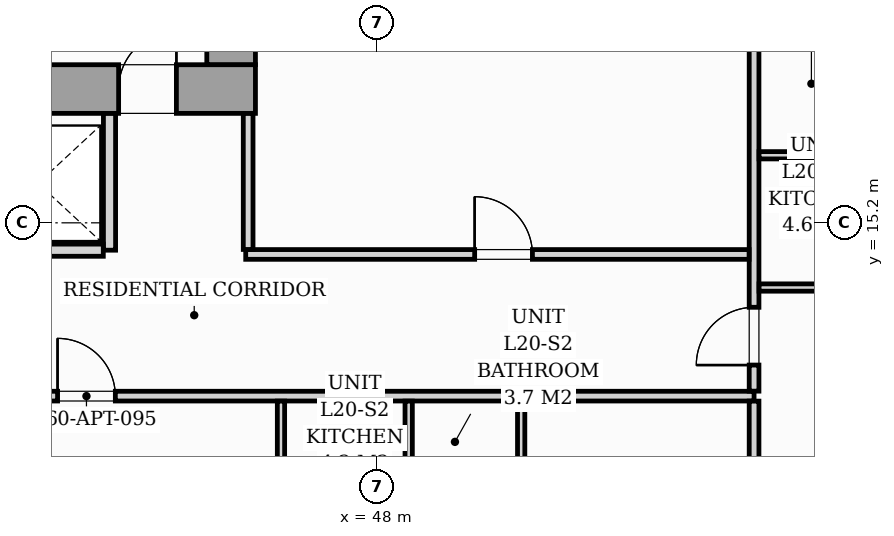
"""IFC4 building model, lengths in metres.
Left out: names, types, materials, properties, quantities, classifications, styles, units other than length and angle.
Written with IfcOpenShell. Run it as: python <this file> out.ifc"""

import sys

from ifc_helpers import new_model, si_unit, direction, frame, frame_2d, origin, origin_2d, place, context, subcontext, project, spatial, rectangle, i_section, extrude, source, transform, mapped, element, fill, save


model = new_model("IFC4")
c1 = context("Model", 3, precision=1e-05, world=origin(), true_north=direction((0.0, 1.0)))
c2 = subcontext(c1, "Body", "Model", "MODEL_VIEW")
j1 = project(units=[si_unit("LENGTHUNIT", "METRE"), si_unit("PLANEANGLEUNIT", "RADIAN")], contexts=[c1])
p1 = place(None, origin())
s1 = spatial("IfcSite", under=j1, at=p1, CompositionType="ELEMENT")
p2 = place(p1, origin())
s2 = spatial("IfcBuilding", under=s1, at=p2, CompositionType="ELEMENT")
p3 = place(p2, frame((0.0, 0.0, 72.6)))
s3 = spatial("IfcBuildingStorey", under=s2, at=p3, CompositionType="ELEMENT", Elevation=72.6)
m1 = source(origin(), c2, "Body", "SweptSolid", [
    extrude(i_section(OverallWidth=0.427, OverallDepth=0.483, WebThickness=0.051, FlangeThickness=0.082, FilletRadius=0.018, at=origin_2d()), origin(), (0.0, 0.0, 1.0), 5.196),
])
p4 = place(p3, frame((45.6, 17.4, 0.002), z_axis=(0.0, 0.0, 1.0), x_axis=(1.0, 0.0, 0.0)))
e1 = element("IfcColumn", 1, at=p4, inside=s3, PredefinedType="PILASTER", context=c2, shape_type="MappedRepresentation", body=[
    mapped(m1, transform((0.0, 0.0, 0.0), scale=1.0)),
])
p5 = place(p3, frame((26.0, 17.4, 0.0), z_axis=(0.0, 0.0, 1.0), x_axis=(1.0, 0.0, 0.0)))
e2 = element("IfcWall", 2, at=p5, inside=s3, PredefinedType="SHEAR", context=c2, shape_type="SweptSolid", body=[
    extrude(rectangle(XDim=20.0, YDim=0.8, at=frame_2d((10.0, 0.0))), origin(), (0.0, 0.0, 1.0), 5.2),
])
p6 = place(p5, frame((1.15, 0.0, 0.0)))
e3 = element("IfcOpeningElement", 3, at=p6, cuts=e2, PredefinedType="OPENING", context=c2, shape_type="SweptSolid", body=[
    extrude(rectangle(XDim=0.95, YDim=2.06, at=frame_2d((0.475, 1.03))), frame((0.0, 0.41, 0.0), z_axis=(0.0, -1.0, 0.0), x_axis=(1.0, 0.0, 0.0)), (0.0, 0.0, 1.0), 0.82),
])
p7 = place(p5, frame((9.58, 0.0, 0.0)))
e4 = element("IfcOpeningElement", 4, at=p7, cuts=e2, PredefinedType="OPENING", context=c2, shape_type="SweptSolid", body=[
    extrude(rectangle(XDim=0.9, YDim=2.06, at=frame_2d((0.45, 1.03))), frame((0.0, 0.41, 0.0), z_axis=(0.0, -1.0, 0.0), x_axis=(1.0, 0.0, 0.0)), (0.0, 0.0, 1.0), 0.82),
])
p8 = place(p5, frame((17.75, 0.0, 0.0)))
e5 = element("IfcOpeningElement", 5, at=p8, cuts=e2, PredefinedType="OPENING", context=c2, shape_type="SweptSolid", body=[
    extrude(rectangle(XDim=0.95, YDim=2.06, at=frame_2d((0.475, 1.03))), frame((0.0, 0.41, 0.0), z_axis=(0.0, -1.0, 0.0), x_axis=(1.0, 0.0, 0.0)), (0.0, 0.0, 1.0), 0.82),
])
p9 = place(p3, frame((45.6, 17.802, 0.0), z_axis=(0.0, 0.0, 1.0), x_axis=(0.0, 1.0, 0.0)))
e6 = element("IfcWall", 6, at=p9, inside=s3, PredefinedType="SHEAR", context=c2, shape_type="SweptSolid", body=[
    extrude(rectangle(XDim=5.796, YDim=0.8, at=frame_2d((2.898, 0.0))), origin(), (0.0, 0.0, 1.0), 5.2),
])
p10 = place(p3, frame((43.6, 14.75, 0.0), z_axis=(0.0, 0.0, 1.0), x_axis=(0.0, 1.0, 0.0)))
e7 = element("IfcWall", 7, at=p10, inside=s3, PredefinedType="PARTITIONING", context=c2, shape_type="SweptSolid", body=[
    extrude(rectangle(XDim=2.248, YDim=0.2, at=frame_2d((1.124, 0.0))), origin(), (0.0, 0.0, 1.0), 4.78),
])
p11 = place(p3, frame((41.352, 14.75, 0.0), z_axis=(0.0, 0.0, 1.0), x_axis=(1.0, 0.0, 0.0)))
e8 = element("IfcWall", 8, at=p11, inside=s3, PredefinedType="PARTITIONING", context=c2, shape_type="SweptSolid", body=[
    extrude(rectangle(XDim=2.146, YDim=0.2, at=frame_2d((1.073, 0.0))), origin(), (0.0, 0.0, 1.0), 4.78),
])
p12 = place(p3, frame((16.6, 12.35, 0.0), z_axis=(0.0, 0.0, 1.0), x_axis=(1.0, 0.0, 0.0)))
e9 = element("IfcWall", 9, at=p12, inside=s3, PredefinedType="PARTITIONING", context=c2, shape_type="SweptSolid", body=[
    extrude(rectangle(XDim=37.6, YDim=0.16, at=frame_2d((18.8, 0.0))), origin(), (0.0, 0.0, 1.0), 4.78),
])
p13 = place(p12, frame((2.665, 0.0, 0.0)))
e10 = element("IfcOpeningElement", 10, at=p13, cuts=e9, PredefinedType="OPENING", context=c2, shape_type="SweptSolid", body=[
    extrude(rectangle(XDim=0.95, YDim=2.06, at=frame_2d((0.475, 1.03))), frame((0.0, 0.09, 0.0), z_axis=(0.0, -1.0, 0.0), x_axis=(1.0, 0.0, 0.0)), (0.0, 0.0, 1.0), 0.18),
])
p14 = place(p12, frame((26.146, 0.0, 0.0)))
e11 = element("IfcOpeningElement", 11, at=p14, cuts=e9, PredefinedType="OPENING", context=c2, shape_type="SweptSolid", body=[
    extrude(rectangle(XDim=0.95, YDim=2.06, at=frame_2d((0.475, 1.03))), frame((0.0, 0.09, 0.0), z_axis=(0.0, -1.0, 0.0), x_axis=(1.0, 0.0, 0.0)), (0.0, 0.0, 1.0), 0.18),
])
p15 = place(p3, frame((54.2, 7.778, 0.0), z_axis=(0.0, 0.0, 1.0), x_axis=(0.0, 1.0, 0.0)))
e12 = element("IfcWall", 12, at=p15, inside=s3, PredefinedType="PARTITIONING", context=c2, shape_type="SweptSolid", body=[
    extrude(rectangle(XDim=4.49, YDim=0.16, at=frame_2d((2.245, 0.0))), origin(), (0.0, 0.0, 1.0), 4.78),
])
p16 = place(p3, frame((54.2, 12.432, 0.0), z_axis=(0.0, 0.0, 1.0), x_axis=(0.0, 1.0, 0.0)))
e13 = element("IfcWall", 13, at=p16, inside=s3, PredefinedType="PARTITIONING", context=c2, shape_type="SweptSolid", body=[
    extrude(rectangle(XDim=15.278, YDim=0.16, at=frame_2d((7.639, 0.0))), origin(), (0.0, 0.0, 1.0), 4.78),
])
p17 = place(p16, frame((0.429, 0.0, 0.0)))
e14 = element("IfcOpeningElement", 14, at=p17, cuts=e13, PredefinedType="OPENING", context=c2, shape_type="SweptSolid", body=[
    extrude(rectangle(XDim=0.95, YDim=2.06, at=frame_2d((0.475, 1.03))), frame((0.0, 0.09, 0.0), z_axis=(0.0, -1.0, 0.0), x_axis=(1.0, 0.0, 0.0)), (0.0, 0.0, 1.0), 0.18),
])
p18 = place(p3, frame((50.37, 7.593, 0.0), z_axis=(0.0, 0.0, 1.0), x_axis=(0.0, 1.0, 0.0)))
e15 = element("IfcWall", 15, at=p18, inside=s3, PredefinedType="PARTITIONING", context=c2, shape_type="SweptSolid", body=[
    extrude(rectangle(XDim=4.676, YDim=0.12, at=frame_2d((2.338, 0.0))), origin(), (0.0, 0.0, 1.0), 4.78),
])
p19 = place(p18, frame((2.633, 0.0, 0.0)))
e16 = element("IfcOpeningElement", 16, at=p19, cuts=e15, PredefinedType="OPENING", context=c2, shape_type="SweptSolid", body=[
    extrude(rectangle(XDim=0.9, YDim=2.05, at=frame_2d((0.45, 1.025))), frame((0.0, 0.07, 0.0), z_axis=(0.0, -1.0, 0.0), x_axis=(1.0, 0.0, 0.0)), (0.0, 0.0, 1.0), 0.14),
])
for number, where, z_axis, x_axis in (
    (17, (48.52, 10.162, 0.0), (0.0, 0.0, 1.0), (0.0, 1.0, 0.0)),
    (18, (46.42, 10.162, 0.0), (0.0, 0.0, 1.0), (0.0, 1.0, 0.0)),
):
    element("IfcWall", number, at=place(p3, frame(where, z_axis=z_axis, x_axis=x_axis)), inside=s3, PredefinedType="PARTITIONING", context=c2, shape_type="SweptSolid", body=[
        extrude(rectangle(XDim=2.106, YDim=0.12, at=frame_2d((1.053, 0.0))), origin(), (0.0, 0.0, 1.0), 4.78),
    ])
p20 = place(p3, frame((54.282, 16.311, 0.0), z_axis=(0.0, 0.0, 1.0), x_axis=(1.0, 0.0, 0.0)))
e19 = element("IfcWall", 19, at=p20, inside=s3, PredefinedType="PARTITIONING", context=c2, shape_type="SweptSolid", body=[
    extrude(rectangle(XDim=2.256, YDim=0.12, at=frame_2d((1.128, 0.0))), origin(), (0.0, 0.0, 1.0), 4.78),
])
p21 = place(p3, frame((54.282, 14.136, 0.0), z_axis=(0.0, 0.0, 1.0), x_axis=(1.0, 0.0, 0.0)))
e20 = element("IfcWall", 20, at=p21, inside=s3, PredefinedType="PARTITIONING", context=c2, shape_type="SweptSolid", body=[
    extrude(rectangle(XDim=2.256, YDim=0.12, at=frame_2d((1.128, 0.0))), origin(), (0.0, 0.0, 1.0), 4.78),
])
p22 = place(p21, frame((1.226, 0.0, 0.0)))
e21 = element("IfcOpeningElement", 21, at=p22, cuts=e20, PredefinedType="OPENING", context=c2, shape_type="SweptSolid", body=[
    extrude(rectangle(XDim=0.85, YDim=2.05, at=frame_2d((0.425, 1.025))), frame((0.0, 0.07, 0.0), z_axis=(0.0, -1.0, 0.0), x_axis=(1.0, 0.0, 0.0)), (0.0, 0.0, 1.0), 0.14),
])
p23 = place(p3, frame((45.84, 14.68, 0.0), z_axis=(0.0, 0.0, 1.0), x_axis=(1.0, 0.0, 0.0)))
e22 = element("IfcWall", 22, at=p23, inside=s3, PredefinedType="PARTITIONING", context=c2, shape_type="SweptSolid", body=[
    extrude(rectangle(XDim=8.278, YDim=0.16, at=frame_2d((4.139, 0.0))), origin(), (0.0, 0.0, 1.0), 4.78),
])
p24 = place(p23, frame((3.765, 0.0, 0.0)))
e23 = element("IfcOpeningElement", 23, at=p24, cuts=e22, PredefinedType="OPENING", context=c2, shape_type="SweptSolid", body=[
    extrude(rectangle(XDim=0.95, YDim=2.06, at=frame_2d((0.475, 1.03))), frame((0.0, 0.09, 0.0), z_axis=(0.0, -1.0, 0.0), x_axis=(1.0, 0.0, 0.0)), (0.0, 0.0, 1.0), 0.18),
])
p25 = place(p3, frame((45.88, 14.762, 0.0), z_axis=(0.0, 0.0, 1.0), x_axis=(0.0, 1.0, 0.0)))
e24 = element("IfcWall", 24, at=p25, inside=s3, PredefinedType="PARTITIONING", context=c2, shape_type="SweptSolid", body=[
    extrude(rectangle(XDim=2.236, YDim=0.16, at=frame_2d((1.118, 0.0))), origin(), (0.0, 0.0, 1.0), 4.78),
])
m2 = source(origin(), c2, "Body", "SweptSolid", [
    extrude(rectangle(XDim=0.95, YDim=2.06, at=frame_2d((0.475, 1.03))), frame((0.0, 0.025, 0.0), z_axis=(0.0, -1.0, 0.0), x_axis=(1.0, 0.0, 0.0)), (0.0, 0.0, 1.0), 0.05),
])
p26 = place(p8, origin())
e25 = element("IfcDoor", 25, at=p26, inside=s3, OperationType="SINGLE_SWING_RIGHT", PredefinedType="DOOR", context=c2, shape_type="MappedRepresentation", body=[
    mapped(m2, transform((0.0, 0.0, 0.0), scale=1.0)),
])
fill(e5, e25)
m3 = source(origin(), c2, "Body", "SweptSolid", [
    extrude(rectangle(XDim=0.95, YDim=2.06, at=frame_2d((0.475, 1.03))), frame((0.0, 0.025, 0.0), z_axis=(0.0, -1.0, 0.0), x_axis=(1.0, 0.0, 0.0)), (0.0, 0.0, 1.0), 0.05),
])
p27 = place(p14, origin())
e26 = element("IfcDoor", 26, at=p27, inside=s3, OperationType="SINGLE_SWING_LEFT", PredefinedType="DOOR", context=c2, shape_type="MappedRepresentation", body=[
    mapped(m3, transform((0.0, 0.0, 0.0), scale=1.0)),
])
fill(e11, e26)
p28 = place(p17, origin())
e27 = element("IfcDoor", 27, at=p28, inside=s3, OperationType="SINGLE_SWING_LEFT", PredefinedType="DOOR", context=c2, shape_type="MappedRepresentation", body=[
    mapped(m3, transform((0.0, 0.0, 0.0), scale=1.0)),
])
fill(e14, e27)
p29 = place(p24, origin())
e28 = element("IfcDoor", 28, at=p29, inside=s3, OperationType="SINGLE_SWING_LEFT", PredefinedType="DOOR", context=c2, shape_type="MappedRepresentation", body=[
    mapped(m3, transform((0.0, 0.0, 0.0), scale=1.0)),
])
fill(e23, e28)
save(model, sys.argv[1])
